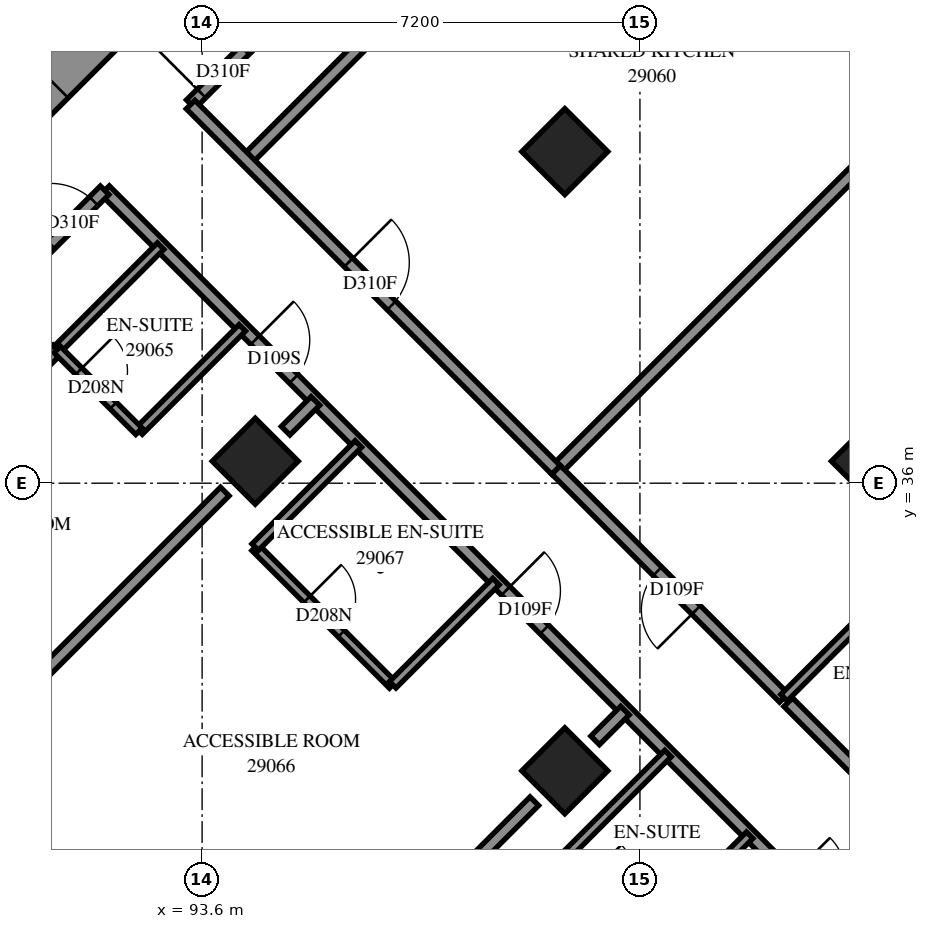
"""IFC4 building model, lengths in metres.
Left out: names, types, materials, properties, quantities, classifications, styles, units other than length and angle.
Written with IfcOpenShell. Run it as: python <this file> out.ifc"""

import sys

from ifc_helpers import new_model, si_unit, direction, frame, frame_2d, origin, origin_2d, place, context, subcontext, project, spatial, polyline, rectangle, outline, extrude, element, fill, save


model = new_model("IFC4")
c1 = context("Model", 3, precision=1e-05, world=origin(), true_north=direction((0.0, 1.0)))
c2 = subcontext(c1, "Body", "Model", "MODEL_VIEW")
j1 = project(units=[si_unit("LENGTHUNIT", "METRE"), si_unit("PLANEANGLEUNIT", "RADIAN")], contexts=[c1])
p1 = place(None, origin())
s1 = spatial("IfcSite", under=j1, at=p1, CompositionType="ELEMENT")
p2 = place(p1, origin())
s2 = spatial("IfcBuilding", under=s1, at=p2, CompositionType="ELEMENT")
p3 = place(p2, frame((0.0, 0.0, 108.4)))
s3 = spatial("IfcBuildingStorey", under=s2, at=p3, CompositionType="ELEMENT", Elevation=108.4)
for number, where, z_axis, x_axis in (
    (1, (99.565, 41.453, 0.0), (0.0, 0.0, 1.0), (0.707, -0.707, 0.0)),
    (2, (94.474, 36.362, 0.0), (0.0, 0.0, 1.0), (0.707, -0.707, 0.0)),
    (3, (104.656, 36.362, 0.0), (0.0, 0.0, 1.0), (0.707, -0.707, 0.0)),
    (4, (99.565, 31.271, 0.0), (0.0, 0.0, 1.0), (0.707, -0.707, 0.0)),
):
    element("IfcColumn", number, at=place(p3, frame(where, z_axis=z_axis, x_axis=x_axis)), inside=s3, PredefinedType="COLUMN", context=c2, shape_type="SweptSolid", body=[
        extrude(rectangle(XDim=1.0, YDim=1.0, at=origin_2d()), origin(), (0.0, 0.0, 1.0), 3.1),
    ])
p4 = place(p3, frame((87.12, 38.625, -0.3), z_axis=(0.0, 0.0, 1.0), x_axis=(0.7071067812, 0.7071067812, 0.0)))
e5 = element("IfcWall", 5, at=p4, inside=s3, PredefinedType="SHEAR", context=c2, shape_type="SweptSolid", body=[
    extrude(rectangle(XDim=14.4, YDim=0.8, at=frame_2d((7.2, 0.0))), origin(), (0.0, 0.0, 1.0), 2.7),
])
p5 = place(p4, frame((4.55, 0.0, 0.3)))
e6 = element("IfcOpeningElement", 6, at=p5, cuts=e5, PredefinedType="OPENING", context=c2, shape_type="SweptSolid", body=[
    extrude(rectangle(XDim=1.1, YDim=2.1, at=frame_2d((0.55, 1.05))), frame((0.0, 0.41, 0.0), z_axis=(0.0, -1.0, 0.0), x_axis=(1.0, 0.0, 0.0)), (0.0, 0.0, 1.0), 0.82),
])
p6 = place(p4, frame((11.35, 0.0, 0.3)))
e7 = element("IfcOpeningElement", 7, at=p6, cuts=e5, PredefinedType="OPENING", context=c2, shape_type="SweptSolid", body=[
    extrude(rectangle(XDim=1.1, YDim=2.1, at=frame_2d((0.55, 1.05))), frame((0.0, 0.41, 0.0), z_axis=(0.0, -1.0, 0.0), x_axis=(1.0, 0.0, 0.0)), (0.0, 0.0, 1.0), 0.82),
])
p7 = place(p3, frame((88.241, 30.341, 0.0), z_axis=(0.0, 0.0, 1.0), x_axis=(0.7969251465, -0.6040780669, 0.0)))
e8 = element("IfcWall", 8, at=p7, inside=s3, PredefinedType="SOLIDWALL", context=c2, shape_type="SweptSolid", body=[
    extrude(outline(polyline([(-0.038, -0.275), (3.937, -0.275), (4.013, 0.275), (0.038, 0.275), (-0.038, -0.275)])), origin(), (0.0, 0.0, 1.0), 3.1),
])
p8 = place(p7, frame((0.606, 0.0, 0.5)))
e9 = element("IfcOpeningElement", 9, at=p8, cuts=e8, PredefinedType="OPENING", context=c2, shape_type="SweptSolid", body=[
    extrude(rectangle(XDim=1.3, YDim=2.45, at=frame_2d((0.65, 1.225))), frame((0.0, 0.285, 0.0), z_axis=(0.0, -1.0, 0.0), x_axis=(1.0, 0.0, 0.0)), (0.0, 0.0, 1.0), 0.57),
])
p9 = place(p7, frame((2.106, 0.0, 0.5)))
e10 = element("IfcOpeningElement", 10, at=p9, cuts=e8, PredefinedType="OPENING", context=c2, shape_type="SweptSolid", body=[
    extrude(rectangle(XDim=1.3, YDim=2.45, at=frame_2d((0.65, 1.225))), frame((0.0, 0.285, 0.0), z_axis=(0.0, -1.0, 0.0), x_axis=(1.0, 0.0, 0.0)), (0.0, 0.0, 1.0), 0.57),
])
p10 = place(p3, frame((92.004, 40.819, 0.0), z_axis=(0.0, 0.0, 1.0), x_axis=(0.7071067812, -0.7071067812, 0.0)))
e11 = element("IfcWall", 11, at=p10, inside=s3, PredefinedType="PARTITIONING", context=c2, shape_type="SweptSolid", body=[
    extrude(rectangle(XDim=19.298, YDim=0.2, at=frame_2d((9.649, 0.0))), origin(), (0.0, 0.0, 1.0), 3.1),
])
p11 = place(p10, frame((3.489, 0.0, 0.0)))
e12 = element("IfcOpeningElement", 12, at=p11, cuts=e11, PredefinedType="OPENING", context=c2, shape_type="SweptSolid", body=[
    extrude(rectangle(XDim=0.9, YDim=2.1, at=frame_2d((0.45, 1.05))), frame((0.0, 0.11, 0.0), z_axis=(0.0, -1.0, 0.0), x_axis=(1.0, 0.0, 0.0)), (0.0, 0.0, 1.0), 0.22),
])
p12 = place(p10, frame((9.319, 0.0, 0.0)))
e13 = element("IfcOpeningElement", 13, at=p12, cuts=e11, PredefinedType="OPENING", context=c2, shape_type="SweptSolid", body=[
    extrude(rectangle(XDim=0.9, YDim=2.1, at=frame_2d((0.45, 1.05))), frame((0.0, 0.11, 0.0), z_axis=(0.0, -1.0, 0.0), x_axis=(1.0, 0.0, 0.0)), (0.0, 0.0, 1.0), 0.22),
])
p13 = place(p10, frame((15.961, 0.0, 0.0)))
e14 = element("IfcOpeningElement", 14, at=p13, cuts=e11, PredefinedType="OPENING", context=c2, shape_type="SweptSolid", body=[
    extrude(rectangle(XDim=0.9, YDim=2.1, at=frame_2d((0.45, 1.05))), frame((0.0, 0.11, 0.0), z_axis=(0.0, -1.0, 0.0), x_axis=(1.0, 0.0, 0.0)), (0.0, 0.0, 1.0), 0.22),
])
p14 = place(p3, frame((99.423, 36.221, 0.0), z_axis=(0.0, 0.0, 1.0), x_axis=(0.7071067812, 0.7071067812, 0.0)))
e15 = element("IfcWall", 15, at=p14, inside=s3, PredefinedType="PARTITIONING", context=c2, shape_type="SweptSolid", body=[
    extrude(rectangle(XDim=12.125, YDim=0.2, at=frame_2d((6.062, 0.0))), origin(), (0.0, 0.0, 1.0), 3.1),
])
p15 = place(p3, frame((94.331, 41.313, 0.0), z_axis=(0.0, 0.0, 1.0), x_axis=(0.7071109253, 0.7071026371, 0.0)))
e16 = element("IfcWall", 16, at=p15, inside=s3, PredefinedType="PARTITIONING", context=c2, shape_type="SweptSolid", body=[
    extrude(rectangle(XDim=12.065, YDim=0.2, at=frame_2d((6.033, 0.0))), origin(), (0.0, 0.0, 1.0), 3.1),
])
p16 = place(p3, frame((93.413, 42.233, 0.0), z_axis=(0.0, 0.0, 1.0), x_axis=(0.7071067812, 0.7071067812, 0.0)))
e17 = element("IfcWall", 17, at=p16, inside=s3, PredefinedType="PARTITIONING", context=c2, shape_type="SweptSolid", body=[
    extrude(rectangle(XDim=9.699, YDim=0.2, at=frame_2d((4.849, 0.0))), origin(), (0.0, 0.0, 1.0), 3.1),
])
p17 = place(p16, frame((0.249, 0.0, 0.0)))
e18 = element("IfcOpeningElement", 18, at=p17, cuts=e17, PredefinedType="OPENING", context=c2, shape_type="SweptSolid", body=[
    extrude(rectangle(XDim=1.0, YDim=2.1, at=frame_2d((0.5, 1.05))), frame((0.0, 0.11, 0.0), z_axis=(0.0, -1.0, 0.0), x_axis=(1.0, 0.0, 0.0)), (0.0, 0.0, 1.0), 0.22),
])
p18 = place(p3, frame((93.411, 42.227, 0.0), z_axis=(0.0, 0.0, 1.0), x_axis=(0.7071067812, -0.7071067812, 0.0)))
e19 = element("IfcWall", 19, at=p18, inside=s3, PredefinedType="PARTITIONING", context=c2, shape_type="SweptSolid", body=[
    extrude(rectangle(XDim=8.499, YDim=0.2, at=frame_2d((4.25, 0.0))), origin(), (0.0, 0.0, 1.0), 3.1),
])
p19 = place(p18, frame((3.672, 0.0, 0.0)))
e20 = element("IfcOpeningElement", 20, at=p19, cuts=e19, PredefinedType="OPENING", context=c2, shape_type="SweptSolid", body=[
    extrude(rectangle(XDim=1.0, YDim=2.1, at=frame_2d((0.5, 1.05))), frame((0.0, 0.11, 0.0), z_axis=(0.0, -1.0, 0.0), x_axis=(1.0, 0.0, 0.0)), (0.0, 0.0, 1.0), 0.22),
])
p20 = place(p3, frame((86.835, 35.655, 0.0), z_axis=(0.0, 0.0, 1.0), x_axis=(0.7071067812, 0.7071067812, 0.0)))
e21 = element("IfcWall", 21, at=p20, inside=s3, PredefinedType="PARTITIONING", context=c2, shape_type="SweptSolid", body=[
    extrude(rectangle(XDim=7.3, YDim=0.2, at=frame_2d((3.65, 0.0))), origin(), (0.0, 0.0, 1.0), 3.1),
])
p21 = place(p20, frame((6.046, 0.0, 0.0)))
e22 = element("IfcOpeningElement", 22, at=p21, cuts=e21, PredefinedType="OPENING", context=c2, shape_type="SweptSolid", body=[
    extrude(rectangle(XDim=1.0, YDim=2.1, at=frame_2d((0.5, 1.05))), frame((0.0, 0.11, 0.0), z_axis=(0.0, -1.0, 0.0), x_axis=(1.0, 0.0, 0.0)), (0.0, 0.0, 1.0), 0.22),
])
p22 = place(p3, frame((86.334, 33.312, 0.0), z_axis=(0.0, 0.0, 1.0), x_axis=(0.7069693124, 0.7072442232, 0.0)))
e23 = element("IfcWall", 23, at=p22, inside=s3, PredefinedType="PARTITIONING", context=c2, shape_type="SweptSolid", body=[
    extrude(rectangle(XDim=6.911, YDim=0.2, at=frame_2d((3.456, 0.0))), origin(), (0.0, 0.0, 1.0), 3.1),
])
p23 = place(p3, frame((89.881, 31.771, 0.0), z_axis=(0.0, 0.0, 1.0), x_axis=(0.7071067812, 0.7071067812, 0.0)))
e24 = element("IfcWall", 24, at=p23, inside=s3, PredefinedType="PARTITIONING", context=c2, shape_type="SweptSolid", body=[
    extrude(rectangle(XDim=5.787, YDim=0.2, at=frame_2d((2.893, 0.0))), origin(), (0.0, 0.0, 1.0), 3.1),
])
p24 = place(p3, frame((94.973, 26.681, 0.0), z_axis=(0.0, 0.0, 1.0), x_axis=(0.7071067812, 0.7071067812, 0.0)))
e25 = element("IfcWall", 25, at=p24, inside=s3, PredefinedType="PARTITIONING", context=c2, shape_type="SweptSolid", body=[
    extrude(rectangle(XDim=5.784, YDim=0.2, at=frame_2d((2.892, 0.0))), origin(), (0.0, 0.0, 1.0), 3.1),
])
p25 = place(p3, frame((103.239, 32.399, 0.0), z_axis=(0.0, 0.0, 1.0), x_axis=(0.7071067812, -0.7071067812, 0.0)))
e26 = element("IfcWall", 26, at=p25, inside=s3, PredefinedType="PARTITIONING", context=c2, shape_type="SweptSolid", body=[
    extrude(rectangle(XDim=5.399, YDim=0.2, at=frame_2d((2.7, 0.0))), origin(), (0.0, 0.0, 1.0), 3.1),
])
p26 = place(p25, frame((2.15, 0.0, 0.0)))
e27 = element("IfcOpeningElement", 27, at=p26, cuts=e26, PredefinedType="OPENING", context=c2, shape_type="SweptSolid", body=[
    extrude(rectangle(XDim=0.9, YDim=2.1, at=frame_2d((0.45, 1.05))), frame((0.0, 0.11, 0.0), z_axis=(0.0, -1.0, 0.0), x_axis=(1.0, 0.0, 0.0)), (0.0, 0.0, 1.0), 0.22),
])
p27 = place(p3, frame((103.168, 32.47, 0.0), z_axis=(0.0, 0.0, 1.0), x_axis=(-0.7067858967, 0.7074275201, 0.0)))
e28 = element("IfcWall", 28, at=p27, inside=s3, PredefinedType="PARTITIONING", context=c2, shape_type="SweptSolid", body=[
    extrude(rectangle(XDim=5.299, YDim=0.2, at=frame_2d((2.65, 0.0))), origin(), (0.0, 0.0, 1.0), 3.1),
])
p28 = place(p27, frame((2.043, 0.0, 0.0)))
e29 = element("IfcOpeningElement", 29, at=p28, cuts=e28, PredefinedType="OPENING", context=c2, shape_type="SweptSolid", body=[
    extrude(rectangle(XDim=0.9, YDim=2.1, at=frame_2d((0.45, 1.05))), frame((0.0, 0.11, 0.0), z_axis=(0.0, -1.0, 0.0), x_axis=(1.0, 0.0, 0.0)), (0.0, 0.0, 1.0), 0.22),
])
p29 = place(p3, frame((94.471, 34.945, 0.0), z_axis=(0.0, 0.0, 1.0), x_axis=(0.7067942478, -0.7074191764, 0.0)))
e30 = element("IfcWall", 30, at=p29, inside=s3, PredefinedType="PARTITIONING", context=c2, shape_type="SweptSolid", body=[
    extrude(rectangle(XDim=3.2, YDim=0.15, at=frame_2d((1.6, 0.0))), origin(), (0.0, 0.0, 1.0), 3.1),
])
p30 = place(p29, frame((1.206, 0.0, 0.0)))
e31 = element("IfcOpeningElement", 31, at=p30, cuts=e30, PredefinedType="OPENING", context=c2, shape_type="SweptSolid", body=[
    extrude(rectangle(XDim=0.8, YDim=2.1, at=frame_2d((0.4, 1.05))), frame((0.0, 0.085, 0.0), z_axis=(0.0, -1.0, 0.0), x_axis=(1.0, 0.0, 0.0)), (0.0, 0.0, 1.0), 0.17),
])
for number, where, z_axis, x_axis in (
    (32, (92.563, 36.857, 0.0), (0.0, 0.0, 1.0), (0.707, 0.707, 0.0)),
    (33, (91.219, 38.201, 0.0), (0.0, 0.0, 1.0), (0.707, 0.707, 0.0)),
    (34, (96.735, 32.685, 0.0), (0.0, 0.0, 1.0), (0.707, 0.707, 0.0)),
    (35, (103.169, 32.473, 0.0), (0.0, 0.0, 1.0), (0.707, 0.707, 0.0)),
    (36, (99.563, 29.857, 0.0), (0.0, 0.0, 1.0), (0.707, 0.707, 0.0)),
    (37, (100.907, 28.513, 0.0), (0.0, 0.0, 1.0), (0.707, 0.707, 0.0)),
):
    element("IfcWall", number, at=place(p3, frame(where, z_axis=z_axis, x_axis=x_axis)), inside=s3, PredefinedType="PARTITIONING", context=c2, shape_type="SweptSolid", body=[
        extrude(rectangle(XDim=2.401, YDim=0.15, at=frame_2d((1.201, 0.0))), origin(), (0.0, 0.0, 1.0), 3.1),
    ])
p31 = place(p3, frame((94.473, 34.949, 0.0), z_axis=(0.0, 0.0, 1.0), x_axis=(0.7071067812, 0.7071067812, 0.0)))
e38 = element("IfcWall", 38, at=p31, inside=s3, PredefinedType="PARTITIONING", context=c2, shape_type="SweptSolid", body=[
    extrude(rectangle(XDim=2.398, YDim=0.15, at=frame_2d((1.199, 0.0))), origin(), (0.0, 0.0, 1.0), 3.1),
])
p32 = place(p3, frame((91.217, 38.197, 0.0), z_axis=(0.0, 0.0, 1.0), x_axis=(0.7071067812, -0.7071067812, 0.0)))
e39 = element("IfcWall", 39, at=p32, inside=s3, PredefinedType="PARTITIONING", context=c2, shape_type="SweptSolid", body=[
    extrude(rectangle(XDim=1.901, YDim=0.15, at=frame_2d((0.95, 0.0))), origin(), (0.0, 0.0, 1.0), 3.1),
])
p33 = place(p32, frame((0.502, 0.0, 0.0)))
e40 = element("IfcOpeningElement", 40, at=p33, cuts=e39, PredefinedType="OPENING", context=c2, shape_type="SweptSolid", body=[
    extrude(rectangle(XDim=0.8, YDim=2.1, at=frame_2d((0.4, 1.05))), frame((0.0, 0.085, 0.0), z_axis=(0.0, -1.0, 0.0), x_axis=(1.0, 0.0, 0.0)), (0.0, 0.0, 1.0), 0.17),
])
for number, where, z_axis, x_axis in (
    (41, (94.973, 36.863, 0.0), (0.0, 0.0, 1.0), (0.707, 0.707, 0.0)),
    (42, (100.063, 31.771, 0.0), (0.0, 0.0, 1.0), (0.707, 0.707, 0.0)),
):
    element("IfcWall", number, at=place(p3, frame(where, z_axis=z_axis, x_axis=x_axis)), inside=s3, PredefinedType="PARTITIONING", context=c2, shape_type="SweptSolid", body=[
        extrude(rectangle(XDim=0.693, YDim=0.2, at=frame_2d((0.346, 0.0))), origin(), (0.0, 0.0, 1.0), 3.1),
    ])
p34 = place(p17, origin())
e43 = element("IfcDoor", 43, at=p34, inside=s3, OperationType="SINGLE_SWING_LEFT", PredefinedType="DOOR", context=c2, shape_type="SweptSolid", body=[
    extrude(rectangle(XDim=1.0, YDim=2.1, at=frame_2d((0.5, 1.05))), frame((0.0, 0.025, 0.0), z_axis=(0.0, -1.0, 0.0), x_axis=(1.0, 0.0, 0.0)), (0.0, 0.0, 1.0), 0.05),
])
fill(e18, e43)
p35 = place(p19, origin())
e44 = element("IfcDoor", 44, at=p35, inside=s3, OperationType="SINGLE_SWING_RIGHT", PredefinedType="DOOR", context=c2, shape_type="SweptSolid", body=[
    extrude(rectangle(XDim=1.0, YDim=2.1, at=frame_2d((0.5, 1.05))), frame((0.0, 0.025, 0.0), z_axis=(0.0, -1.0, 0.0), x_axis=(1.0, 0.0, 0.0)), (0.0, 0.0, 1.0), 0.05),
])
fill(e20, e44)
p36 = place(p28, origin())
e45 = element("IfcDoor", 45, at=p36, inside=s3, OperationType="SINGLE_SWING_RIGHT", PredefinedType="DOOR", context=c2, shape_type="SweptSolid", body=[
    extrude(rectangle(XDim=0.9, YDim=2.1, at=frame_2d((0.45, 1.05))), frame((0.0, 0.025, 0.0), z_axis=(0.0, -1.0, 0.0), x_axis=(1.0, 0.0, 0.0)), (0.0, 0.0, 1.0), 0.05),
])
fill(e29, e45)
p37 = place(p21, origin())
e46 = element("IfcDoor", 46, at=p37, inside=s3, OperationType="SINGLE_SWING_RIGHT", PredefinedType="DOOR", context=c2, shape_type="SweptSolid", body=[
    extrude(rectangle(XDim=1.0, YDim=2.1, at=frame_2d((0.5, 1.05))), frame((0.0, 0.025, 0.0), z_axis=(0.0, -1.0, 0.0), x_axis=(1.0, 0.0, 0.0)), (0.0, 0.0, 1.0), 0.05),
])
fill(e22, e46)
p38 = place(p11, origin())
e47 = element("IfcDoor", 47, at=p38, inside=s3, OperationType="SINGLE_SWING_LEFT", PredefinedType="DOOR", context=c2, shape_type="SweptSolid", body=[
    extrude(rectangle(XDim=0.9, YDim=2.1, at=frame_2d((0.45, 1.05))), frame((0.0, 0.025, 0.0), z_axis=(0.0, -1.0, 0.0), x_axis=(1.0, 0.0, 0.0)), (0.0, 0.0, 1.0), 0.05),
])
fill(e12, e47)
p39 = place(p33, origin())
e48 = element("IfcDoor", 48, at=p39, inside=s3, OperationType="SINGLE_SWING_RIGHT", PredefinedType="DOOR", context=c2, shape_type="SweptSolid", body=[
    extrude(rectangle(XDim=0.8, YDim=2.1, at=frame_2d((0.4, 1.05))), frame((0.0, 0.025, 0.0), z_axis=(0.0, -1.0, 0.0), x_axis=(1.0, 0.0, 0.0)), (0.0, 0.0, 1.0), 0.05),
])
fill(e40, e48)
p40 = place(p12, origin())
e49 = element("IfcDoor", 49, at=p40, inside=s3, OperationType="SINGLE_SWING_RIGHT", PredefinedType="DOOR", context=c2, shape_type="SweptSolid", body=[
    extrude(rectangle(XDim=0.9, YDim=2.1, at=frame_2d((0.45, 1.05))), frame((0.0, 0.025, 0.0), z_axis=(0.0, -1.0, 0.0), x_axis=(1.0, 0.0, 0.0)), (0.0, 0.0, 1.0), 0.05),
])
fill(e13, e49)
p41 = place(p30, origin())
e50 = element("IfcDoor", 50, at=p41, inside=s3, OperationType="SINGLE_SWING_RIGHT", PredefinedType="DOOR", context=c2, shape_type="SweptSolid", body=[
    extrude(rectangle(XDim=0.8, YDim=2.1, at=frame_2d((0.4, 1.05))), frame((0.0, 0.025, 0.0), z_axis=(0.0, -1.0, 0.0), x_axis=(1.0, 0.0, 0.0)), (0.0, 0.0, 1.0), 0.05),
])
fill(e31, e50)
save(model, sys.argv[1])
